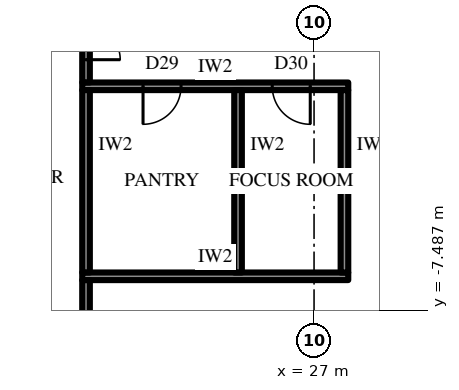
"""IFC4 building model, lengths in metres.
Left out: names, types, materials, properties, quantities, classifications, styles, units other than length and angle.
Written with IfcOpenShell. Run it as: python <this file> out.ifc"""

import sys

from ifc_helpers import new_model, si_unit, direction, frame, frame_2d, origin, place, context, subcontext, project, spatial, rectangle, extrude, element, fill, save


model = new_model("IFC4")
c1 = context("Model", 3, precision=1e-05, world=origin(), true_north=direction((0.0, 1.0)))
c2 = subcontext(c1, "Body", "Model", "MODEL_VIEW")
j1 = project(units=[si_unit("LENGTHUNIT", "METRE"), si_unit("PLANEANGLEUNIT", "RADIAN")], contexts=[c1])
p1 = place(None, origin())
s1 = spatial("IfcSite", under=j1, at=p1, CompositionType="ELEMENT")
p2 = place(p1, origin())
s2 = spatial("IfcBuilding", under=s1, at=p2, CompositionType="ELEMENT")
p3 = place(p2, frame((0.0, 0.0, 94.9)))
s3 = spatial("IfcBuildingStorey", under=s2, at=p3, CompositionType="ELEMENT", Elevation=94.9)
p4 = place(p3, frame((21.232, -30.925, 0.0), z_axis=(0.0, 0.0, 1.0), x_axis=(0.499999163675, 0.866025886636, 0.0)))
e1 = element("IfcWall", 1, at=p4, inside=s3, PredefinedType="SOLIDWALL", context=c2, shape_type="SweptSolid", body=[
    extrude(rectangle(XDim=32.332, YDim=0.3, at=frame_2d((16.166, 0.0))), origin(), (0.0, 0.0, 1.0), 2.7),
])
p5 = place(p4, frame((1.319, 0.0, 0.6)))
e2 = element("IfcOpeningElement", 2, at=p5, cuts=e1, PredefinedType="OPENING", context=c2, shape_type="SweptSolid", body=[
    extrude(rectangle(XDim=2.75, YDim=1.85, at=frame_2d((1.375, 0.925))), frame((0.0, 0.16, 0.0), z_axis=(0.0, -1.0, 0.0), x_axis=(1.0, 0.0, 0.0)), (0.0, 0.0, 1.0), 0.32),
])
p6 = place(p4, frame((6.708, 0.0, 0.6)))
e3 = element("IfcOpeningElement", 3, at=p6, cuts=e1, PredefinedType="OPENING", context=c2, shape_type="SweptSolid", body=[
    extrude(rectangle(XDim=2.75, YDim=1.85, at=frame_2d((1.375, 0.925))), frame((0.0, 0.16, 0.0), z_axis=(0.0, -1.0, 0.0), x_axis=(1.0, 0.0, 0.0)), (0.0, 0.0, 1.0), 0.32),
])
p7 = place(p4, frame((12.872, 0.0, 0.0)))
e4 = element("IfcOpeningElement", 4, at=p7, cuts=e1, PredefinedType="OPENING", context=c2, shape_type="SweptSolid", body=[
    extrude(rectangle(XDim=1.2, YDim=2.4, at=frame_2d((0.6, 1.2))), frame((0.0, 0.16, 0.0), z_axis=(0.0, -1.0, 0.0), x_axis=(1.0, 0.0, 0.0)), (0.0, 0.0, 1.0), 0.32),
])
p8 = place(p4, frame((17.485, 0.0, 0.6)))
e5 = element("IfcOpeningElement", 5, at=p8, cuts=e1, PredefinedType="OPENING", context=c2, shape_type="SweptSolid", body=[
    extrude(rectangle(XDim=2.75, YDim=1.85, at=frame_2d((1.375, 0.925))), frame((0.0, 0.16, 0.0), z_axis=(0.0, -1.0, 0.0), x_axis=(1.0, 0.0, 0.0)), (0.0, 0.0, 1.0), 0.32),
])
p9 = place(p4, frame((22.874, 0.0, 0.6)))
e6 = element("IfcOpeningElement", 6, at=p9, cuts=e1, PredefinedType="OPENING", context=c2, shape_type="SweptSolid", body=[
    extrude(rectangle(XDim=2.75, YDim=1.85, at=frame_2d((1.375, 0.925))), frame((0.0, 0.16, 0.0), z_axis=(0.0, -1.0, 0.0), x_axis=(1.0, 0.0, 0.0)), (0.0, 0.0, 1.0), 0.32),
])
p10 = place(p4, frame((28.262, 0.0, 0.6)))
e7 = element("IfcOpeningElement", 7, at=p10, cuts=e1, PredefinedType="OPENING", context=c2, shape_type="SweptSolid", body=[
    extrude(rectangle(XDim=2.75, YDim=1.85, at=frame_2d((1.375, 0.925))), frame((0.0, 0.16, 0.0), z_axis=(0.0, -1.0, 0.0), x_axis=(1.0, 0.0, 0.0)), (0.0, 0.0, 1.0), 0.32),
])
p11 = place(p3, frame((20.9, -1.6, 0.0), z_axis=(0.0, 0.0, 1.0), x_axis=(1.0, 0.0, 0.0)))
e8 = element("IfcWall", 8, at=p11, inside=s3, PredefinedType="PARTITIONING", context=c2, shape_type="SweptSolid", body=[
    extrude(rectangle(XDim=7.0, YDim=0.2, at=frame_2d((3.5, 0.0))), origin(), (0.0, 0.0, 1.0), 4.0),
])
p12 = place(p11, frame((1.6, 0.0, 0.0)))
e9 = element("IfcOpeningElement", 9, at=p12, cuts=e8, PredefinedType="OPENING", context=c2, shape_type="SweptSolid", body=[
    extrude(rectangle(XDim=1.0, YDim=2.2, at=frame_2d((0.5, 1.1))), frame((0.0, 0.11, 0.0), z_axis=(0.0, -1.0, 0.0), x_axis=(1.0, 0.0, 0.0)), (0.0, 0.0, 1.0), 0.22),
])
p13 = place(p11, frame((5.0, 0.0, 0.0)))
e10 = element("IfcOpeningElement", 10, at=p13, cuts=e8, PredefinedType="OPENING", context=c2, shape_type="SweptSolid", body=[
    extrude(rectangle(XDim=1.0, YDim=2.2, at=frame_2d((0.5, 1.1))), frame((0.0, 0.11, 0.0), z_axis=(0.0, -1.0, 0.0), x_axis=(1.0, 0.0, 0.0)), (0.0, 0.0, 1.0), 0.22),
])
p14 = place(p3, frame((20.9, -6.6, 0.0), z_axis=(0.0, 0.0, 1.0), x_axis=(1.0, 0.0, 0.0)))
e11 = element("IfcWall", 11, at=p14, inside=s3, PredefinedType="PARTITIONING", context=c2, shape_type="SweptSolid", body=[
    extrude(rectangle(XDim=7.0, YDim=0.2, at=frame_2d((3.5, 0.0))), origin(), (0.0, 0.0, 1.0), 4.0),
])
for number, where, z_axis, x_axis in (
    (12, (21.0, -1.7, 0.0), (0.0, 0.0, 1.0), (0.0, -1.0, 0.0)),
    (13, (25.0, -1.7, 0.0), (0.0, 0.0, 1.0), (0.0, -1.0, 0.0)),
    (14, (27.8, -1.7, 0.0), (0.0, 0.0, 1.0), (0.0, -1.0, 0.0)),
):
    element("IfcWall", number, at=place(p3, frame(where, z_axis=z_axis, x_axis=x_axis)), inside=s3, PredefinedType="PARTITIONING", context=c2, shape_type="SweptSolid", body=[
        extrude(rectangle(XDim=4.8, YDim=0.2, at=frame_2d((2.4, 0.0))), origin(), (0.0, 0.0, 1.0), 4.0),
    ])
p15 = place(p3, frame((21.0, -6.701, 0.0), z_axis=(0.0, 0.0, 1.0), x_axis=(0.0, -1.0, 0.0)))
e15 = element("IfcWall", 15, at=p15, inside=s3, PredefinedType="PARTITIONING", context=c2, shape_type="SweptSolid", body=[
    extrude(rectangle(XDim=6.399, YDim=0.2, at=frame_2d((3.2, 0.0))), origin(), (0.0, 0.0, 1.0), 4.0),
])
p16 = place(p3, frame((21.0, 13.1, 0.0), z_axis=(0.0, 0.0, 1.0), x_axis=(0.0, -1.0, 0.0)))
e16 = element("IfcWall", 16, at=p16, inside=s3, PredefinedType="PARTITIONING", context=c2, shape_type="SweptSolid", body=[
    extrude(rectangle(XDim=14.599, YDim=0.2, at=frame_2d((7.3, 0.0))), origin(), (0.0, 0.0, 1.0), 4.0),
])
p17 = place(p16, frame((12.2, 0.0, 0.0)))
e17 = element("IfcOpeningElement", 17, at=p17, cuts=e16, PredefinedType="OPENING", context=c2, shape_type="SweptSolid", body=[
    extrude(rectangle(XDim=1.8, YDim=2.4, at=frame_2d((0.9, 1.2))), frame((0.0, 0.11, 0.0), z_axis=(0.0, -1.0, 0.0), x_axis=(1.0, 0.0, 0.0)), (0.0, 0.0, 1.0), 0.22),
])
p18 = place(p12, frame((1.0, 0.0, 0.0), z_axis=(0.0, 0.0, 1.0), x_axis=(-1.0, 0.0, 0.0)))
e18 = element("IfcDoor", 18, at=p18, inside=s3, OperationType="SINGLE_SWING_LEFT", PredefinedType="DOOR", context=c2, shape_type="SweptSolid", body=[
    extrude(rectangle(XDim=1.0, YDim=2.2, at=frame_2d((0.5, 1.1))), frame((0.0, 0.025, 0.0), z_axis=(0.0, -1.0, 0.0), x_axis=(1.0, 0.0, 0.0)), (0.0, 0.0, 1.0), 0.05),
])
fill(e9, e18)
p19 = place(p13, frame((1.0, 0.0, 0.0), z_axis=(0.0, 0.0, 1.0), x_axis=(-1.0, 0.0, 0.0)))
e19 = element("IfcDoor", 19, at=p19, inside=s3, OperationType="SINGLE_SWING_RIGHT", PredefinedType="DOOR", context=c2, shape_type="SweptSolid", body=[
    extrude(rectangle(XDim=1.0, YDim=2.2, at=frame_2d((0.5, 1.1))), frame((0.0, 0.025, 0.0), z_axis=(0.0, -1.0, 0.0), x_axis=(1.0, 0.0, 0.0)), (0.0, 0.0, 1.0), 0.05),
])
fill(e10, e19)
p20 = place(p17, origin())
e20 = element("IfcDoor", 20, at=p20, inside=s3, OperationType="DOUBLE_DOOR_SINGLE_SWING", PredefinedType="DOOR", context=c2, shape_type="SweptSolid", body=[
    extrude(rectangle(XDim=1.8, YDim=2.4, at=frame_2d((0.9, 1.2))), frame((0.0, 0.025, 0.0), z_axis=(0.0, -1.0, 0.0), x_axis=(1.0, 0.0, 0.0)), (0.0, 0.0, 1.0), 0.05),
])
fill(e17, e20)
save(model, sys.argv[1])
